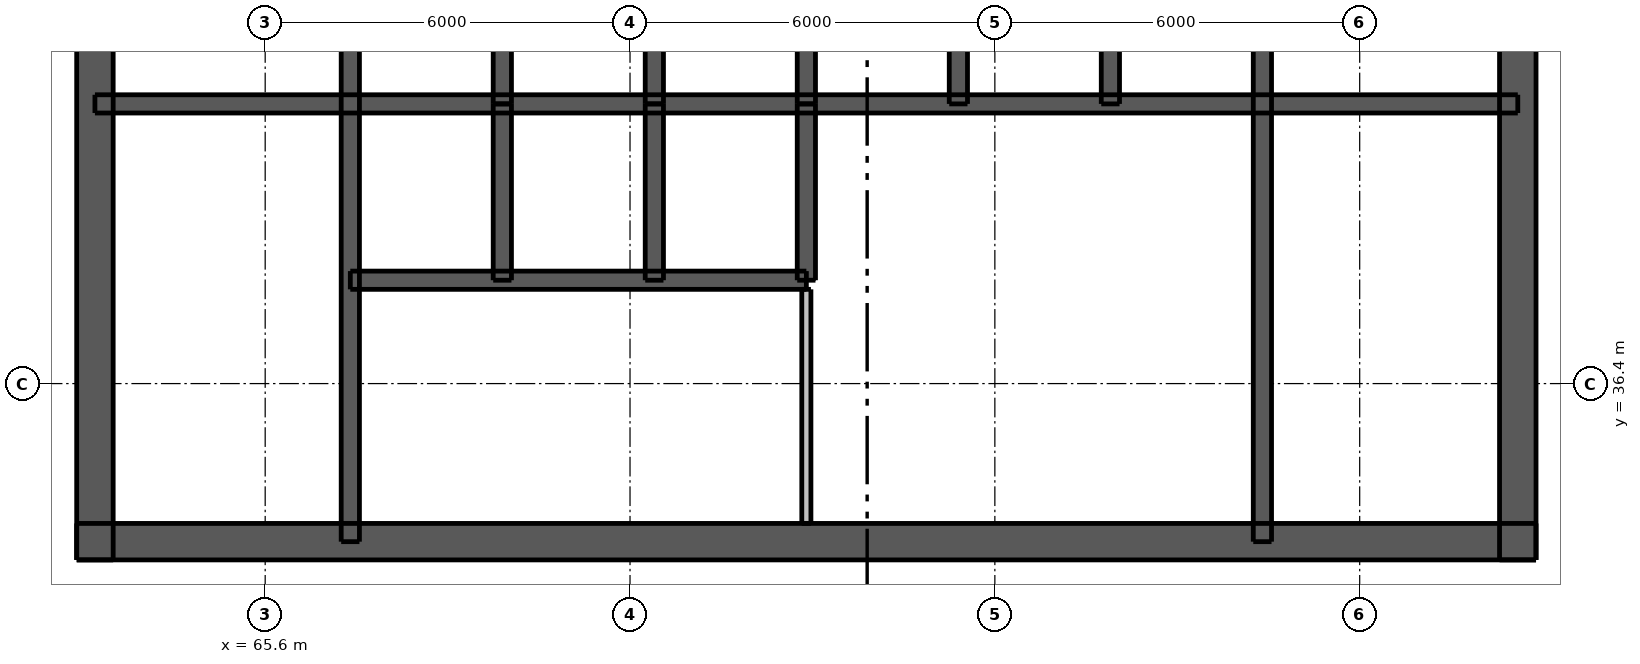
"""IFC4 building model, lengths in metres.
Left out: names, types, materials, properties, quantities, classifications, styles, units other than length and angle.
Written with IfcOpenShell. Run it as: python <this file> out.ifc"""

import sys

from ifc_helpers import new_model, si_unit, direction, frame, frame_2d, origin, place, context, subcontext, project, spatial, rectangle, extrude, element, fill, save


model = new_model("IFC4")
c1 = context("Model", 3, precision=1e-05, world=origin(), true_north=direction((0.0, 1.0)))
c2 = subcontext(c1, "Body", "Model", "MODEL_VIEW")
j1 = project(units=[si_unit("LENGTHUNIT", "METRE"), si_unit("PLANEANGLEUNIT", "RADIAN")], contexts=[c1])
p1 = place(None, origin())
s1 = spatial("IfcSite", under=j1, at=p1, CompositionType="ELEMENT")
p2 = place(p1, origin())
s2 = spatial("IfcBuilding", under=s1, at=p2, CompositionType="ELEMENT")
p3 = place(p2, frame((0.0, 0.0, 203.5)))
s3 = spatial("IfcBuildingStorey", under=s2, at=p3, CompositionType="ELEMENT", Elevation=203.5)
p4 = place(p3, frame((62.5, 33.8, 0.0), z_axis=(0.0, 0.0, 1.0), x_axis=(1.0, 0.0, 0.0)))
e1 = element("IfcWall", 1, at=p4, inside=s3, PredefinedType="SHEAR", context=c2, shape_type="SweptSolid", body=[
    extrude(rectangle(XDim=24.0, YDim=0.6, at=frame_2d((12.0, 0.0))), origin(), (0.0, 0.0, 1.0), 3.05),
])
p5 = place(p4, frame((1.925, 0.0, 0.0)))
e2 = element("IfcOpeningElement", 2, at=p5, cuts=e1, PredefinedType="OPENING", context=c2, shape_type="SweptSolid", body=[
    extrude(rectangle(XDim=1.1, YDim=2.1, at=frame_2d((0.55, 1.05))), frame((0.0, 0.31, 0.0), z_axis=(0.0, -1.0, 0.0), x_axis=(1.0, 0.0, 0.0)), (0.0, 0.0, 1.0), 0.62),
])
p6 = place(p4, frame((20.975, 0.0, 0.0)))
e3 = element("IfcOpeningElement", 3, at=p6, cuts=e1, PredefinedType="OPENING", context=c2, shape_type="SweptSolid", body=[
    extrude(rectangle(XDim=1.1, YDim=2.1, at=frame_2d((0.55, 1.05))), frame((0.0, 0.31, 0.0), z_axis=(0.0, -1.0, 0.0), x_axis=(1.0, 0.0, 0.0)), (0.0, 0.0, 1.0), 0.62),
])
p7 = place(p4, frame((8.0, 0.0, 0.0)))
e4 = element("IfcOpeningElement", 4, at=p7, cuts=e1, PredefinedType="OPENING", context=c2, shape_type="SweptSolid", body=[
    extrude(rectangle(XDim=1.1, YDim=2.1, at=frame_2d((0.55, 1.05))), frame((0.0, 0.31, 0.0), z_axis=(0.0, -1.0, 0.0), x_axis=(1.0, 0.0, 0.0)), (0.0, 0.0, 1.0), 0.62),
])
p8 = place(p4, frame((15.3, 0.0, 0.0)))
e5 = element("IfcOpeningElement", 5, at=p8, cuts=e1, PredefinedType="OPENING", context=c2, shape_type="SweptSolid", body=[
    extrude(rectangle(XDim=0.9, YDim=2.1, at=frame_2d((0.45, 1.05))), frame((0.0, 0.31, 0.0), z_axis=(0.0, -1.0, 0.0), x_axis=(1.0, 0.0, 0.0)), (0.0, 0.0, 1.0), 0.62),
])
p9 = place(p3, frame((62.8, 33.5, 0.0), z_axis=(0.0, 0.0, 1.0), x_axis=(0.0, 1.0, 0.0)))
e6 = element("IfcWall", 6, at=p9, inside=s3, PredefinedType="SHEAR", context=c2, shape_type="SweptSolid", body=[
    extrude(rectangle(XDim=24.0, YDim=0.6, at=frame_2d((12.0, 0.0))), origin(), (0.0, 0.0, 1.0), 3.05),
])
p10 = place(p9, frame((11.2, 0.0, 0.0)))
e7 = element("IfcOpeningElement", 7, at=p10, cuts=e6, PredefinedType="OPENING", context=c2, shape_type="SweptSolid", body=[
    extrude(rectangle(XDim=1.6, YDim=2.1, at=frame_2d((0.8, 1.05))), frame((0.0, 0.31, 0.0), z_axis=(0.0, -1.0, 0.0), x_axis=(1.0, 0.0, 0.0)), (0.0, 0.0, 1.0), 0.62),
])
p11 = place(p3, frame((86.2, 33.5, 0.0), z_axis=(0.0, 0.0, 1.0), x_axis=(0.0, 1.0, 0.0)))
e8 = element("IfcWall", 8, at=p11, inside=s3, PredefinedType="SHEAR", context=c2, shape_type="SweptSolid", body=[
    extrude(rectangle(XDim=24.0, YDim=0.6, at=frame_2d((12.0, 0.0))), origin(), (0.0, 0.0, 1.0), 3.05),
])
p12 = place(p11, frame((11.2, 0.0, 0.0)))
e9 = element("IfcOpeningElement", 9, at=p12, cuts=e8, PredefinedType="OPENING", context=c2, shape_type="SweptSolid", body=[
    extrude(rectangle(XDim=1.6, YDim=2.1, at=frame_2d((0.8, 1.05))), frame((0.0, 0.31, 0.0), z_axis=(0.0, -1.0, 0.0), x_axis=(1.0, 0.0, 0.0)), (0.0, 0.0, 1.0), 0.62),
])
p13 = place(p3, frame((62.8, 41.0, 0.0), z_axis=(0.0, 0.0, 1.0), x_axis=(1.0, 0.0, 0.0)))
e10 = element("IfcWall", 10, at=p13, inside=s3, PredefinedType="SHEAR", context=c2, shape_type="SweptSolid", body=[
    extrude(rectangle(XDim=23.4, YDim=0.3, at=frame_2d((11.7, 0.0))), origin(), (0.0, 0.0, 1.0), 3.05),
])
p14 = place(p3, frame((67.0, 33.8, 0.0), z_axis=(0.0, 0.0, 1.0), x_axis=(0.0, 1.0, 0.0)))
e11 = element("IfcWall", 11, at=p14, inside=s3, PredefinedType="SHEAR", context=c2, shape_type="SweptSolid", body=[
    extrude(rectangle(XDim=10.1, YDim=0.3, at=frame_2d((5.05, 0.0))), origin(), (0.0, 0.0, 1.0), 3.05),
])
p15 = place(p14, frame((0.5, 0.0, 0.0)))
e12 = element("IfcOpeningElement", 12, at=p15, cuts=e11, PredefinedType="OPENING", context=c2, shape_type="SweptSolid", body=[
    extrude(rectangle(XDim=1.1, YDim=2.1, at=frame_2d((0.55, 1.05))), frame((0.0, 0.16, 0.0), z_axis=(0.0, -1.0, 0.0), x_axis=(1.0, 0.0, 0.0)), (0.0, 0.0, 1.0), 0.32),
])
p16 = place(p3, frame((82.0, 33.8, 0.0), z_axis=(0.0, 0.0, 1.0), x_axis=(0.0, 1.0, 0.0)))
e13 = element("IfcWall", 13, at=p16, inside=s3, PredefinedType="SHEAR", context=c2, shape_type="SweptSolid", body=[
    extrude(rectangle(XDim=10.1, YDim=0.3, at=frame_2d((5.05, 0.0))), origin(), (0.0, 0.0, 1.0), 3.05),
])
for number, where, z_axis, x_axis in (
    (14, (69.5, 41.0, 0.0), (0.0, 0.0, 1.0), (0.0, 1.0, 0.0)),
    (15, (72.0, 41.0, 0.0), (0.0, 0.0, 1.0), (0.0, 1.0, 0.0)),
    (16, (74.5, 41.0, 0.0), (0.0, 0.0, 1.0), (0.0, 1.0, 0.0)),
    (17, (77.0, 41.0, 0.0), (0.0, 0.0, 1.0), (0.0, 1.0, 0.0)),
    (18, (79.5, 41.0, 0.0), (0.0, 0.0, 1.0), (0.0, 1.0, 0.0)),
):
    element("IfcWall", number, at=place(p3, frame(where, z_axis=z_axis, x_axis=x_axis)), inside=s3, PredefinedType="SHEAR", context=c2, shape_type="SweptSolid", body=[
        extrude(rectangle(XDim=2.9, YDim=0.3, at=frame_2d((1.45, 0.0))), origin(), (0.0, 0.0, 1.0), 3.05),
    ])
p17 = place(p3, frame((67.0, 38.1, 0.0), z_axis=(0.0, 0.0, 1.0), x_axis=(1.0, 0.0, 0.0)))
e19 = element("IfcWall", 19, at=p17, inside=s3, PredefinedType="SHEAR", context=c2, shape_type="SweptSolid", body=[
    extrude(rectangle(XDim=7.5, YDim=0.3, at=frame_2d((3.75, 0.0))), origin(), (0.0, 0.0, 1.0), 3.05),
])
p18 = place(p17, frame((0.7, 0.0, 0.0)))
e20 = element("IfcOpeningElement", 20, at=p18, cuts=e19, PredefinedType="OPENING", context=c2, shape_type="SweptSolid", body=[
    extrude(rectangle(XDim=1.1, YDim=2.1, at=frame_2d((0.55, 1.05))), frame((0.0, 0.16, 0.0), z_axis=(0.0, -1.0, 0.0), x_axis=(1.0, 0.0, 0.0)), (0.0, 0.0, 1.0), 0.32),
])
p19 = place(p17, frame((3.2, 0.0, 0.0)))
e21 = element("IfcOpeningElement", 21, at=p19, cuts=e19, PredefinedType="OPENING", context=c2, shape_type="SweptSolid", body=[
    extrude(rectangle(XDim=1.1, YDim=2.1, at=frame_2d((0.55, 1.05))), frame((0.0, 0.16, 0.0), z_axis=(0.0, -1.0, 0.0), x_axis=(1.0, 0.0, 0.0)), (0.0, 0.0, 1.0), 0.32),
])
p20 = place(p17, frame((5.65, 0.0, 0.0)))
e22 = element("IfcOpeningElement", 22, at=p20, cuts=e19, PredefinedType="OPENING", context=c2, shape_type="SweptSolid", body=[
    extrude(rectangle(XDim=1.2, YDim=2.1, at=frame_2d((0.6, 1.05))), frame((0.0, 0.16, 0.0), z_axis=(0.0, -1.0, 0.0), x_axis=(1.0, 0.0, 0.0)), (0.0, 0.0, 1.0), 0.32),
])
for number, where, z_axis, x_axis in (
    (23, (69.5, 38.1, 0.0), (0.0, 0.0, 1.0), (0.0, 1.0, 0.0)),
    (24, (72.0, 38.1, 0.0), (0.0, 0.0, 1.0), (0.0, 1.0, 0.0)),
    (25, (74.5, 38.1, 0.0), (0.0, 0.0, 1.0), (0.0, 1.0, 0.0)),
):
    element("IfcWall", number, at=place(p3, frame(where, z_axis=z_axis, x_axis=x_axis)), inside=s3, PredefinedType="SHEAR", context=c2, shape_type="SweptSolid", body=[
        extrude(rectangle(XDim=2.9, YDim=0.3, at=frame_2d((1.45, 0.0))), origin(), (0.0, 0.0, 1.0), 3.05),
    ])
p21 = place(p3, frame((74.5, 34.1, 0.0), z_axis=(0.0, 0.0, 1.0), x_axis=(0.0, 1.0, 0.0)))
e26 = element("IfcWall", 26, at=p21, inside=s3, PredefinedType="PLUMBINGWALL", context=c2, shape_type="SweptSolid", body=[
    extrude(rectangle(XDim=3.85, YDim=0.15, at=frame_2d((1.925, 0.0))), origin(), (0.0, 0.0, 1.0), 3.05),
])
p22 = place(p5, origin())
e27 = element("IfcDoor", 27, at=p22, inside=s3, OperationType="SINGLE_SWING_LEFT", PredefinedType="DOOR", context=c2, shape_type="SweptSolid", body=[
    extrude(rectangle(XDim=1.1, YDim=2.1, at=frame_2d((0.55, 1.05))), frame((0.0, 0.288, 0.0), z_axis=(0.0, -1.0, 0.0), x_axis=(1.0, 0.0, 0.0)), (0.0, 0.0, 1.0), 0.05),
])
fill(e2, e27)
p23 = place(p6, origin())
e28 = element("IfcDoor", 28, at=p23, inside=s3, OperationType="SINGLE_SWING_RIGHT", PredefinedType="DOOR", context=c2, shape_type="SweptSolid", body=[
    extrude(rectangle(XDim=1.1, YDim=2.1, at=frame_2d((0.55, 1.05))), frame((0.0, 0.288, 0.0), z_axis=(0.0, -1.0, 0.0), x_axis=(1.0, 0.0, 0.0)), (0.0, 0.0, 1.0), 0.05),
])
fill(e3, e28)
p24 = place(p7, origin())
e29 = element("IfcDoor", 29, at=p24, inside=s3, OperationType="SINGLE_SWING_LEFT", PredefinedType="DOOR", context=c2, shape_type="SweptSolid", body=[
    extrude(rectangle(XDim=1.1, YDim=2.1, at=frame_2d((0.55, 1.05))), frame((0.0, 0.288, 0.0), z_axis=(0.0, -1.0, 0.0), x_axis=(1.0, 0.0, 0.0)), (0.0, 0.0, 1.0), 0.05),
])
fill(e4, e29)
p25 = place(p15, origin())
e30 = element("IfcDoor", 30, at=p25, inside=s3, OperationType="SINGLE_SWING_RIGHT", PredefinedType="DOOR", context=c2, shape_type="SweptSolid", body=[
    extrude(rectangle(XDim=1.1, YDim=2.1, at=frame_2d((0.55, 1.05))), frame((0.0, -0.087, 0.0), z_axis=(0.0, -1.0, 0.0), x_axis=(1.0, 0.0, 0.0)), (0.0, 0.0, 1.0), 0.05),
])
fill(e12, e30)
p26 = place(p8, origin())
e31 = element("IfcDoor", 31, at=p26, inside=s3, OperationType="SINGLE_SWING_LEFT", PredefinedType="DOOR", context=c2, shape_type="SweptSolid", body=[
    extrude(rectangle(XDim=0.9, YDim=2.1, at=frame_2d((0.45, 1.05))), frame((0.0, 0.288, 0.0), z_axis=(0.0, -1.0, 0.0), x_axis=(1.0, 0.0, 0.0)), (0.0, 0.0, 1.0), 0.05),
])
fill(e5, e31)
p27 = place(p18, origin())
e32 = element("IfcDoor", 32, at=p27, inside=s3, OperationType="DOUBLE_DOOR_SLIDING", PredefinedType="DOOR", context=c2, shape_type="SweptSolid", body=[
    extrude(rectangle(XDim=1.1, YDim=2.1, at=frame_2d((0.55, 1.05))), frame((0.0, 0.025, 0.0), z_axis=(0.0, -1.0, 0.0), x_axis=(1.0, 0.0, 0.0)), (0.0, 0.0, 1.0), 0.05),
])
fill(e20, e32)
p28 = place(p19, origin())
e33 = element("IfcDoor", 33, at=p28, inside=s3, OperationType="DOUBLE_DOOR_SLIDING", PredefinedType="DOOR", context=c2, shape_type="SweptSolid", body=[
    extrude(rectangle(XDim=1.1, YDim=2.1, at=frame_2d((0.55, 1.05))), frame((0.0, 0.025, 0.0), z_axis=(0.0, -1.0, 0.0), x_axis=(1.0, 0.0, 0.0)), (0.0, 0.0, 1.0), 0.05),
])
fill(e21, e33)
p29 = place(p20, origin())
e34 = element("IfcDoor", 34, at=p29, inside=s3, OperationType="DOUBLE_DOOR_SLIDING", PredefinedType="DOOR", context=c2, shape_type="SweptSolid", body=[
    extrude(rectangle(XDim=1.2, YDim=2.1, at=frame_2d((0.6, 1.05))), frame((0.0, 0.025, 0.0), z_axis=(0.0, -1.0, 0.0), x_axis=(1.0, 0.0, 0.0)), (0.0, 0.0, 1.0), 0.05),
])
fill(e22, e34)
save(model, sys.argv[1])
